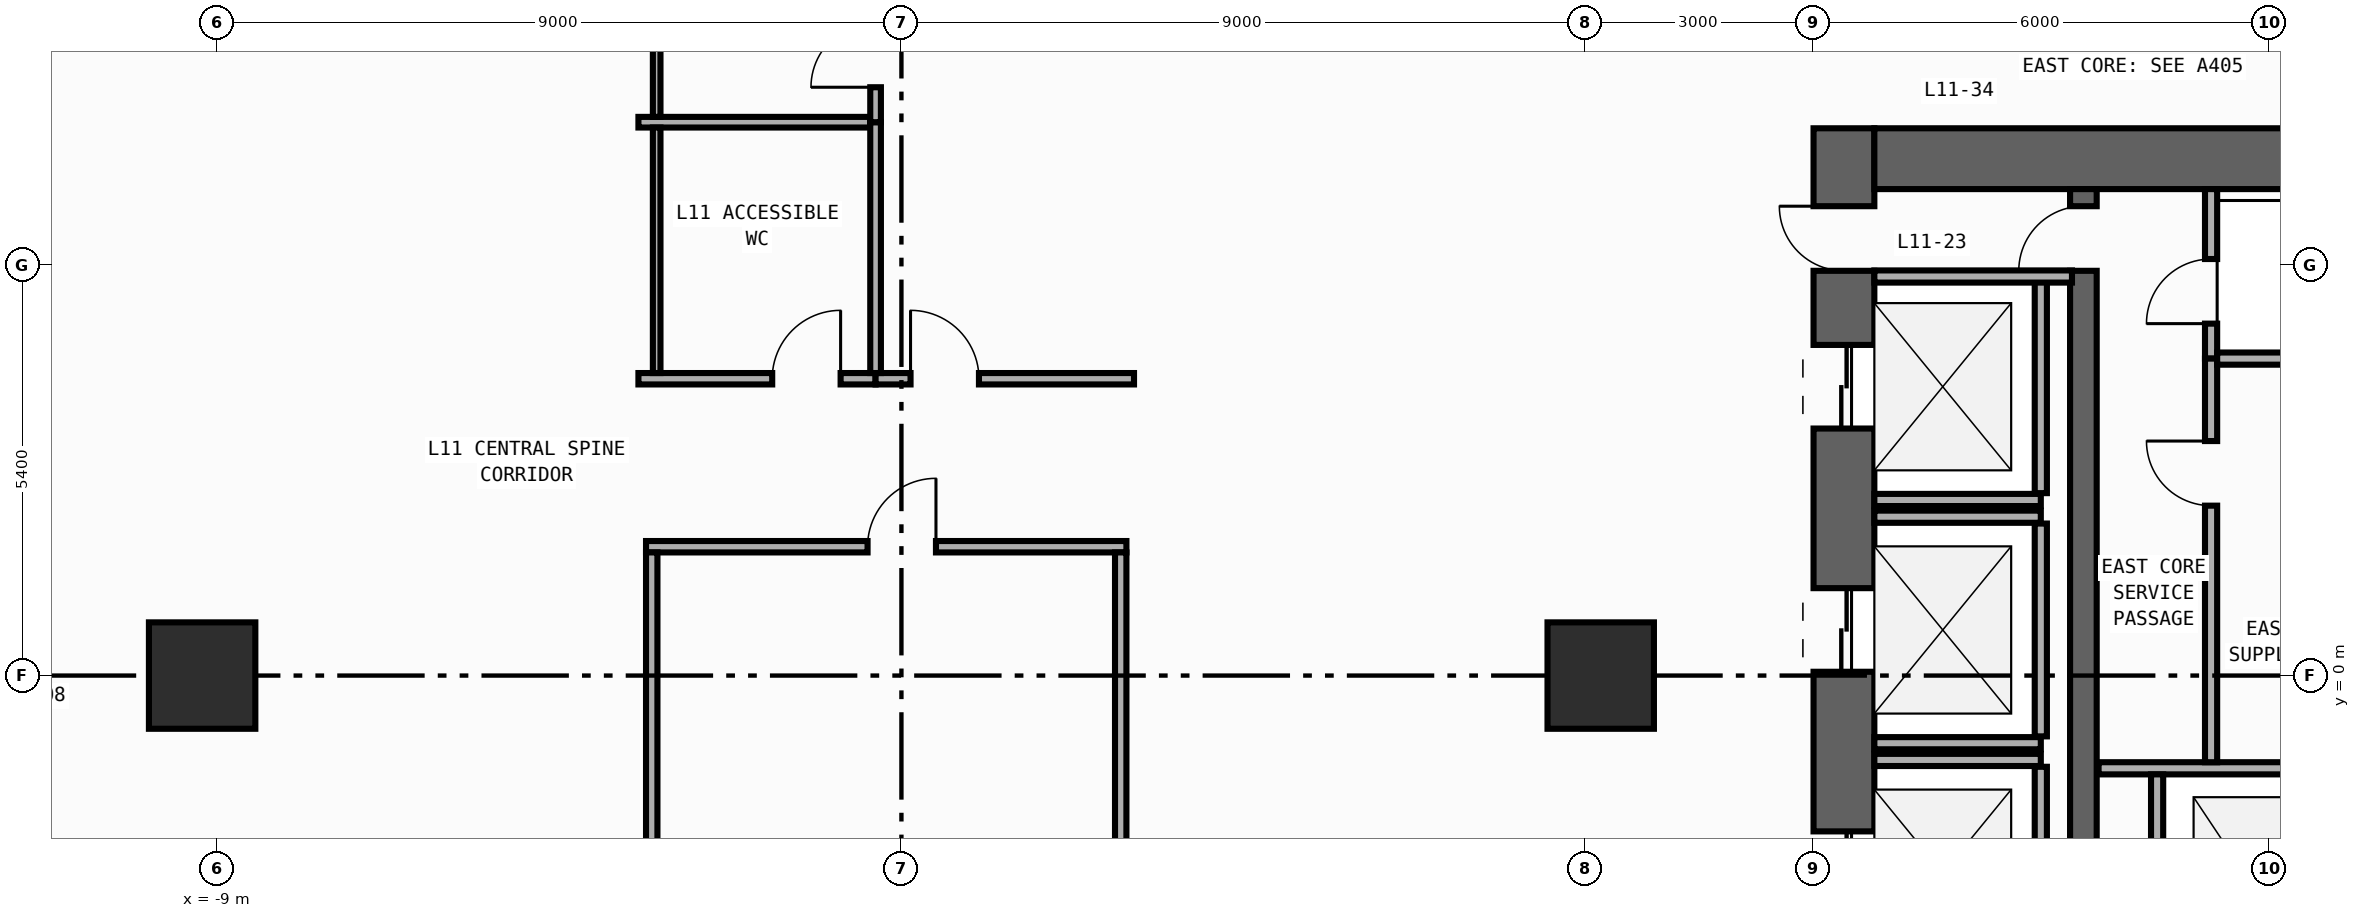
"""IFC4 building model, lengths in metres.
Left out: names, types, materials, properties, quantities, classifications, styles, units other than length and angle.
Written with IfcOpenShell. Run it as: python <this file> out.ifc"""

import sys

from ifc_helpers import new_model, si_unit, direction, frame, frame_2d, origin, origin_2d, place, context, subcontext, project, spatial, rectangle, extrude, element, fill, save


model = new_model("IFC4")
c1 = context("Model", 3, precision=1e-05, world=origin(), true_north=direction((0.0, 1.0)))
c2 = subcontext(c1, "Body", "Model", "MODEL_VIEW")
j1 = project(units=[si_unit("LENGTHUNIT", "METRE"), si_unit("PLANEANGLEUNIT", "RADIAN")], contexts=[c1])
p1 = place(None, origin())
s1 = spatial("IfcSite", under=j1, at=p1, CompositionType="ELEMENT")
p2 = place(p1, origin())
s2 = spatial("IfcBuilding", under=s1, at=p2, CompositionType="ELEMENT")
p3 = place(p2, frame((0.0, 0.0, 47.0)))
s3 = spatial("IfcBuildingStorey", under=s2, at=p3, CompositionType="ELEMENT", Elevation=47.0)
p4 = place(p3, frame((12.4, -19.8, 0.0), z_axis=(0.0, 0.0, 1.0), x_axis=(0.0, 1.0, 0.0)))
e1 = element("IfcWall", 1, at=p4, inside=s3, PredefinedType="SHEAR", context=c2, shape_type="SweptSolid", body=[
    extrude(rectangle(XDim=27.0, YDim=0.8, at=frame_2d((13.5, 0.0))), origin(), (0.0, 0.0, 1.0), 3.94),
])
p5 = place(p4, frame((23.05, 0.0, 0.0)))
e2 = element("IfcOpeningElement", 2, at=p5, cuts=e1, PredefinedType="OPENING", context=c2, shape_type="SweptSolid", body=[
    extrude(rectangle(XDim=1.1, YDim=2.2, at=frame_2d((0.55, 1.1))), frame((0.0, 0.41, 0.0), z_axis=(0.0, -1.0, 0.0), x_axis=(1.0, 0.0, 0.0)), (0.0, 0.0, 1.0), 0.82),
])
p6 = place(p4, frame((19.85, 0.0, 0.0)))
e3 = element("IfcOpeningElement", 3, at=p6, cuts=e1, PredefinedType="OPENING", context=c2, shape_type="SweptSolid", body=[
    extrude(rectangle(XDim=1.1, YDim=2.2, at=frame_2d((0.55, 1.1))), frame((0.0, 0.41, 0.0), z_axis=(0.0, -1.0, 0.0), x_axis=(1.0, 0.0, 0.0)), (0.0, 0.0, 1.0), 0.82),
])
p7 = place(p4, frame((16.65, 0.0, 0.0)))
e4 = element("IfcOpeningElement", 4, at=p7, cuts=e1, PredefinedType="OPENING", context=c2, shape_type="SweptSolid", body=[
    extrude(rectangle(XDim=1.1, YDim=2.2, at=frame_2d((0.55, 1.1))), frame((0.0, 0.41, 0.0), z_axis=(0.0, -1.0, 0.0), x_axis=(1.0, 0.0, 0.0)), (0.0, 0.0, 1.0), 0.82),
])
p8 = place(p4, frame((10.175, 0.0, 0.0)))
e5 = element("IfcOpeningElement", 5, at=p8, cuts=e1, PredefinedType="OPENING", context=c2, shape_type="SweptSolid", body=[
    extrude(rectangle(XDim=0.85, YDim=2.1, at=frame_2d((0.425, 1.05))), frame((0.0, 0.41, 0.0), z_axis=(0.0, -1.0, 0.0), x_axis=(1.0, 0.0, 0.0)), (0.0, 0.0, 1.0), 0.82),
])
p9 = place(p4, frame((12.725, 0.0, 0.0)))
e6 = element("IfcOpeningElement", 6, at=p9, cuts=e1, PredefinedType="OPENING", context=c2, shape_type="SweptSolid", body=[
    extrude(rectangle(XDim=1.15, YDim=2.2, at=frame_2d((0.575, 1.1))), frame((0.0, 0.41, 0.0), z_axis=(0.0, -1.0, 0.0), x_axis=(1.0, 0.0, 0.0)), (0.0, 0.0, 1.0), 0.82),
])
p10 = place(p4, frame((25.125, 0.0, 0.0)))
e7 = element("IfcOpeningElement", 7, at=p10, cuts=e1, PredefinedType="OPENING", context=c2, shape_type="SweptSolid", body=[
    extrude(rectangle(XDim=0.85, YDim=2.1, at=frame_2d((0.425, 1.05))), frame((0.0, 0.41, 0.0), z_axis=(0.0, -1.0, 0.0), x_axis=(1.0, 0.0, 0.0)), (0.0, 0.0, 1.0), 0.82),
])
p11 = place(p3, frame((12.8, 6.8, 0.0), z_axis=(0.0, 0.0, 1.0), x_axis=(1.0, 0.0, 0.0)))
e8 = element("IfcWall", 8, at=p11, inside=s3, PredefinedType="SHEAR", context=c2, shape_type="SweptSolid", body=[
    extrude(rectangle(XDim=6.8, YDim=0.8, at=frame_2d((3.4, 0.0))), origin(), (0.0, 0.0, 1.0), 3.94),
])
p12 = place(p3, frame((15.55, -19.0, 0.0), z_axis=(0.0, 0.0, 1.0), x_axis=(0.0, 1.0, 0.0)))
e9 = element("IfcWall", 9, at=p12, inside=s3, PredefinedType="SHEAR", context=c2, shape_type="SweptSolid", body=[
    extrude(rectangle(XDim=25.4, YDim=0.35, at=frame_2d((12.7, 0.0))), origin(), (0.0, 0.0, 1.0), 3.94),
])
p13 = place(p12, frame((11.925, 0.0, 0.0)))
e10 = element("IfcOpeningElement", 10, at=p13, cuts=e9, PredefinedType="OPENING", context=c2, shape_type="SweptSolid", body=[
    extrude(rectangle(XDim=1.15, YDim=2.2, at=frame_2d((0.575, 1.1))), frame((0.0, 0.185, 0.0), z_axis=(0.0, -1.0, 0.0), x_axis=(1.0, 0.0, 0.0)), (0.0, 0.0, 1.0), 0.37),
])
p14 = place(p12, frame((24.325, 0.0, 0.0)))
e11 = element("IfcOpeningElement", 11, at=p14, cuts=e9, PredefinedType="OPENING", context=c2, shape_type="SweptSolid", body=[
    extrude(rectangle(XDim=0.85, YDim=2.1, at=frame_2d((0.425, 1.05))), frame((0.0, 0.185, 0.0), z_axis=(0.0, -1.0, 0.0), x_axis=(1.0, 0.0, 0.0)), (0.0, 0.0, 1.0), 0.37),
])
for number, where, z_axis, x_axis in (
    (12, (-9.2, 0.0, 0.0), (0.0, 0.0, 1.0), (1.0, 0.0, 0.0)),
    (13, (9.2, 0.0, 0.0), (0.0, 0.0, 1.0), (1.0, 0.0, 0.0)),
):
    element("IfcColumn", number, at=place(p3, frame(where, z_axis=z_axis, x_axis=x_axis)), inside=s3, PredefinedType="COLUMN", context=c2, shape_type="SweptSolid", body=[
        extrude(rectangle(XDim=1.4, YDim=1.4, at=origin_2d()), origin(), (0.0, 0.0, 1.0), 4.2),
    ])
p15 = place(p3, frame((12.8, 2.31, 0.0), z_axis=(0.0, 0.0, 1.0), x_axis=(1.0, 0.0, 0.0)))
e14 = element("IfcWall", 14, at=p15, inside=s3, PredefinedType="STANDARD", context=c2, shape_type="SweptSolid", body=[
    extrude(rectangle(XDim=2.19, YDim=0.16, at=frame_2d((1.095, 0.0))), origin(), (0.0, 0.0, 1.0), 3.94),
])
p16 = place(p3, frame((14.99, 2.4, 0.0), z_axis=(0.0, 0.0, 1.0), x_axis=(0.0, 1.0, 0.0)))
e15 = element("IfcWall", 15, at=p16, inside=s3, PredefinedType="STANDARD", context=c2, shape_type="SweptSolid", body=[
    extrude(rectangle(XDim=2.8, YDim=0.16, at=frame_2d((1.4, 0.0))), origin(), (0.0, 0.0, 1.0), 3.94),
])
for number, where, z_axis, x_axis in (
    (16, (12.8, -0.89, 0.0), (0.0, 0.0, 1.0), (1.0, 0.0, 0.0)),
    (17, (12.8, 2.09, 0.0), (0.0, 0.0, 1.0), (1.0, 0.0, 0.0)),
):
    element("IfcWall", number, at=place(p3, frame(where, z_axis=z_axis, x_axis=x_axis)), inside=s3, PredefinedType="STANDARD", context=c2, shape_type="SweptSolid", body=[
        extrude(rectangle(XDim=2.19, YDim=0.16, at=frame_2d((1.095, 0.0))), origin(), (0.0, 0.0, 1.0), 3.94),
    ])
p17 = place(p3, frame((14.99, -0.8, 0.0), z_axis=(0.0, 0.0, 1.0), x_axis=(0.0, 1.0, 0.0)))
e18 = element("IfcWall", 18, at=p17, inside=s3, PredefinedType="STANDARD", context=c2, shape_type="SweptSolid", body=[
    extrude(rectangle(XDim=2.8, YDim=0.16, at=frame_2d((1.4, 0.0))), origin(), (0.0, 0.0, 1.0), 3.94),
])
p18 = place(p3, frame((12.8, -1.11, 0.0), z_axis=(0.0, 0.0, 1.0), x_axis=(1.0, 0.0, 0.0)))
e19 = element("IfcWall", 19, at=p18, inside=s3, PredefinedType="STANDARD", context=c2, shape_type="SweptSolid", body=[
    extrude(rectangle(XDim=2.19, YDim=0.16, at=frame_2d((1.095, 0.0))), origin(), (0.0, 0.0, 1.0), 3.94),
])
p19 = place(p3, frame((14.99, -4.0, 0.0), z_axis=(0.0, 0.0, 1.0), x_axis=(0.0, 1.0, 0.0)))
e20 = element("IfcWall", 20, at=p19, inside=s3, PredefinedType="STANDARD", context=c2, shape_type="SweptSolid", body=[
    extrude(rectangle(XDim=2.8, YDim=0.16, at=frame_2d((1.4, 0.0))), origin(), (0.0, 0.0, 1.0), 3.94),
])
p20 = place(p3, frame((15.75, -1.22, 0.0), z_axis=(0.0, 0.0, 1.0), x_axis=(1.0, 0.0, 0.0)))
e21 = element("IfcWall", 21, at=p20, inside=s3, PredefinedType="STANDARD", context=c2, shape_type="SweptSolid", body=[
    extrude(rectangle(XDim=3.8, YDim=0.16, at=frame_2d((1.9, 0.0))), origin(), (0.0, 0.0, 1.0), 3.94),
])
p21 = place(p3, frame((16.52, -4.28, 0.0), z_axis=(0.0, 0.0, 1.0), x_axis=(0.0, 1.0, 0.0)))
e22 = element("IfcWall", 22, at=p21, inside=s3, PredefinedType="STANDARD", context=c2, shape_type="SweptSolid", body=[
    extrude(rectangle(XDim=2.98, YDim=0.16, at=frame_2d((1.49, 0.0))), origin(), (0.0, 0.0, 1.0), 3.94),
])
p22 = place(p3, frame((12.8, 5.25, 0.0), z_axis=(0.0, 0.0, 1.0), x_axis=(1.0, 0.0, 0.0)))
e23 = element("IfcWall", 23, at=p22, inside=s3, PredefinedType="STANDARD", context=c2, shape_type="SweptSolid", body=[
    extrude(rectangle(XDim=2.6, YDim=0.16, at=frame_2d((1.3, 0.0))), origin(), (0.0, 0.0, 1.0), 3.94),
])
p23 = place(p3, frame((17.23, 4.17, 0.0), z_axis=(0.0, 0.0, 1.0), x_axis=(0.0, 1.0, 0.0)))
e24 = element("IfcWall", 24, at=p23, inside=s3, PredefinedType="PARTITIONING", context=c2, shape_type="SweptSolid", body=[
    extrude(rectangle(XDim=2.23, YDim=0.16, at=frame_2d((1.115, 0.0))), origin(), (0.0, 0.0, 1.0), 3.94),
])
p24 = place(p23, frame((0.46, 0.0, 0.0)))
e25 = element("IfcOpeningElement", 25, at=p24, cuts=e24, PredefinedType="OPENING", context=c2, shape_type="SweptSolid", body=[
    extrude(rectangle(XDim=0.85, YDim=2.1, at=frame_2d((0.425, 1.05))), frame((0.0, 0.09, 0.0), z_axis=(0.0, -1.0, 0.0), x_axis=(1.0, 0.0, 0.0)), (0.0, 0.0, 1.0), 0.18),
])
p25 = place(p3, frame((17.23, -1.14, 0.0), z_axis=(0.0, 0.0, 1.0), x_axis=(0.0, 1.0, 0.0)))
e26 = element("IfcWall", 26, at=p25, inside=s3, PredefinedType="PARTITIONING", context=c2, shape_type="SweptSolid", body=[
    extrude(rectangle(XDim=5.31, YDim=0.16, at=frame_2d((2.655, 0.0))), origin(), (0.0, 0.0, 1.0), 3.94),
])
p26 = place(p25, frame((3.375, 0.0, 0.0)))
e27 = element("IfcOpeningElement", 27, at=p26, cuts=e26, PredefinedType="OPENING", context=c2, shape_type="SweptSolid", body=[
    extrude(rectangle(XDim=0.85, YDim=2.1, at=frame_2d((0.425, 1.05))), frame((0.0, 0.09, 0.0), z_axis=(0.0, -1.0, 0.0), x_axis=(1.0, 0.0, 0.0)), (0.0, 0.0, 1.0), 0.18),
])
p27 = place(p3, frame((17.31, 4.17, 0.0), z_axis=(0.0, 0.0, 1.0), x_axis=(1.0, 0.0, 0.0)))
e28 = element("IfcWall", 28, at=p27, inside=s3, PredefinedType="PARTITIONING", context=c2, shape_type="SweptSolid", body=[
    extrude(rectangle(XDim=2.29, YDim=0.16, at=frame_2d((1.145, 0.0))), origin(), (0.0, 0.0, 1.0), 3.94),
])
p28 = place(p3, frame((-3.46, 3.905, 0.0), z_axis=(0.0, 0.0, 1.0), x_axis=(1.0, 0.0, 0.0)))
e29 = element("IfcWall", 29, at=p28, inside=s3, PredefinedType="PARTITIONING", context=c2, shape_type="SweptSolid", body=[
    extrude(rectangle(XDim=3.12, YDim=0.15, at=frame_2d((1.56, 0.0))), origin(), (0.0, 0.0, 1.0), 3.94),
])
p29 = place(p28, frame((1.76, 0.0, 0.0)))
e30 = element("IfcOpeningElement", 30, at=p29, cuts=e29, PredefinedType="OPENING", context=c2, shape_type="SweptSolid", body=[
    extrude(rectangle(XDim=0.9, YDim=2.15, at=frame_2d((0.45, 1.075))), frame((0.0, 0.085, 0.0), z_axis=(0.0, -1.0, 0.0), x_axis=(1.0, 0.0, 0.0)), (0.0, 0.0, 1.0), 0.17),
])
p30 = place(p3, frame((-0.34, 3.905, 0.0), z_axis=(0.0, 0.0, 1.0), x_axis=(1.0, 0.0, 0.0)))
e31 = element("IfcWall", 31, at=p30, inside=s3, PredefinedType="PARTITIONING", context=c2, shape_type="SweptSolid", body=[
    extrude(rectangle(XDim=3.4, YDim=0.15, at=frame_2d((1.7, 0.0))), origin(), (0.0, 0.0, 1.0), 3.94),
])
p31 = place(p30, frame((0.46, 0.0, 0.0)))
e32 = element("IfcOpeningElement", 32, at=p31, cuts=e31, PredefinedType="OPENING", context=c2, shape_type="SweptSolid", body=[
    extrude(rectangle(XDim=0.9, YDim=2.15, at=frame_2d((0.45, 1.075))), frame((0.0, 0.085, 0.0), z_axis=(0.0, -1.0, 0.0), x_axis=(1.0, 0.0, 0.0)), (0.0, 0.0, 1.0), 0.17),
])
p32 = place(p3, frame((-3.36, 1.695, 0.0), z_axis=(0.0, 0.0, 1.0), x_axis=(1.0, 0.0, 0.0)))
e33 = element("IfcWall", 33, at=p32, inside=s3, PredefinedType="PARTITIONING", context=c2, shape_type="SweptSolid", body=[
    extrude(rectangle(XDim=6.32, YDim=0.15, at=frame_2d((3.16, 0.0))), origin(), (0.0, 0.0, 1.0), 3.94),
])
p33 = place(p32, frame((2.915, 0.0, 0.0)))
e34 = element("IfcOpeningElement", 34, at=p33, cuts=e33, PredefinedType="OPENING", context=c2, shape_type="SweptSolid", body=[
    extrude(rectangle(XDim=0.9, YDim=2.15, at=frame_2d((0.45, 1.075))), frame((0.0, 0.085, 0.0), z_axis=(0.0, -1.0, 0.0), x_axis=(1.0, 0.0, 0.0)), (0.0, 0.0, 1.0), 0.17),
])
p34 = place(p3, frame((-3.285, -15.385, 0.0), z_axis=(0.0, 0.0, 1.0), x_axis=(0.0, 1.0, 0.0)))
e35 = element("IfcWall", 35, at=p34, inside=s3, PredefinedType="PARTITIONING", context=c2, shape_type="SweptSolid", body=[
    extrude(rectangle(XDim=17.005, YDim=0.15, at=frame_2d((8.502, 0.0))), origin(), (0.0, 0.0, 1.0), 3.94),
])
p35 = place(p34, frame((9.571, 0.0, 0.0)))
e36 = element("IfcOpeningElement", 36, at=p35, cuts=e35, PredefinedType="OPENING", context=c2, shape_type="SweptSolid", body=[
    extrude(rectangle(XDim=0.9, YDim=2.15, at=frame_2d((0.45, 1.075))), frame((0.0, 0.085, 0.0), z_axis=(0.0, -1.0, 0.0), x_axis=(1.0, 0.0, 0.0)), (0.0, 0.0, 1.0), 0.17),
])
p36 = place(p3, frame((2.885, -15.385, 0.0), z_axis=(0.0, 0.0, 1.0), x_axis=(0.0, 1.0, 0.0)))
e37 = element("IfcWall", 37, at=p36, inside=s3, PredefinedType="PARTITIONING", context=c2, shape_type="SweptSolid", body=[
    extrude(rectangle(XDim=17.005, YDim=0.15, at=frame_2d((8.502, 0.0))), origin(), (0.0, 0.0, 1.0), 3.94),
])
p37 = place(p36, frame((9.571, 0.0, 0.0)))
e38 = element("IfcOpeningElement", 38, at=p37, cuts=e37, PredefinedType="OPENING", context=c2, shape_type="SweptSolid", body=[
    extrude(rectangle(XDim=0.9, YDim=2.15, at=frame_2d((0.45, 1.075))), frame((0.0, 0.085, 0.0), z_axis=(0.0, -1.0, 0.0), x_axis=(1.0, 0.0, 0.0)), (0.0, 0.0, 1.0), 0.17),
])
p38 = place(p3, frame((-3.46, 7.28, 0.0), z_axis=(0.0, 0.0, 1.0), x_axis=(1.0, 0.0, 0.0)))
e39 = element("IfcWall", 39, at=p38, inside=s3, PredefinedType="PARTITIONING", context=c2, shape_type="SweptSolid", body=[
    extrude(rectangle(XDim=3.05, YDim=0.14, at=frame_2d((1.525, 0.0))), origin(), (0.0, 0.0, 1.0), 3.94),
])
p39 = place(p3, frame((-0.34, 3.98, 0.0), z_axis=(0.0, 0.0, 1.0), x_axis=(0.0, 1.0, 0.0)))
e40 = element("IfcWall", 40, at=p39, inside=s3, PredefinedType="PARTITIONING", context=c2, shape_type="SweptSolid", body=[
    extrude(rectangle(XDim=3.3, YDim=0.14, at=frame_2d((1.65, 0.0))), origin(), (0.0, 0.0, 1.0), 3.94),
])
p40 = place(p3, frame((-0.34, 7.28, 0.0), z_axis=(0.0, 0.0, 1.0), x_axis=(0.0, 1.0, 0.0)))
e41 = element("IfcWall", 41, at=p40, inside=s3, PredefinedType="PARTITIONING", context=c2, shape_type="SweptSolid", body=[
    extrude(rectangle(XDim=6.96, YDim=0.14, at=frame_2d((3.48, 0.0))), origin(), (0.0, 0.0, 1.0), 3.94),
])
p41 = place(p40, frame((0.46, 0.0, 0.0)))
e42 = element("IfcOpeningElement", 42, at=p41, cuts=e41, PredefinedType="OPENING", context=c2, shape_type="SweptSolid", body=[
    extrude(rectangle(XDim=0.85, YDim=2.1, at=frame_2d((0.425, 1.05))), frame((0.0, 0.08, 0.0), z_axis=(0.0, -1.0, 0.0), x_axis=(1.0, 0.0, 0.0)), (0.0, 0.0, 1.0), 0.16),
])
p42 = place(p3, frame((-3.22, 3.98, 0.0), z_axis=(0.0, 0.0, 1.0), x_axis=(0.0, 1.0, 0.0)))
e43 = element("IfcWall", 43, at=p42, inside=s3, PredefinedType="PARTITIONING", context=c2, shape_type="SweptSolid", body=[
    extrude(rectangle(XDim=3.23, YDim=0.1, at=frame_2d((1.615, 0.0))), origin(), (0.0, 0.0, 1.0), 3.94),
])
p43 = place(p3, frame((-3.22, 7.35, 0.0), z_axis=(0.0, 0.0, 1.0), x_axis=(0.0, 1.0, 0.0)))
e44 = element("IfcWall", 44, at=p43, inside=s3, PredefinedType="PARTITIONING", context=c2, shape_type="SweptSolid", body=[
    extrude(rectangle(XDim=6.6, YDim=0.1, at=frame_2d((3.3, 0.0))), origin(), (0.0, 0.0, 1.0), 3.94),
])
p44 = place(p5, origin())
e45 = element("IfcDoor", 45, at=p44, inside=s3, OperationType="DOUBLE_DOOR_SLIDING", PredefinedType="DOOR", context=c2, shape_type="SweptSolid", body=[
    extrude(rectangle(XDim=1.1, YDim=2.2, at=frame_2d((0.55, 1.1))), frame((0.0, 0.025, 0.0), z_axis=(0.0, -1.0, 0.0), x_axis=(1.0, 0.0, 0.0)), (0.0, 0.0, 1.0), 0.05),
])
fill(e2, e45)
p45 = place(p6, origin())
e46 = element("IfcDoor", 46, at=p45, inside=s3, OperationType="DOUBLE_DOOR_SLIDING", PredefinedType="DOOR", context=c2, shape_type="SweptSolid", body=[
    extrude(rectangle(XDim=1.1, YDim=2.2, at=frame_2d((0.55, 1.1))), frame((0.0, 0.025, 0.0), z_axis=(0.0, -1.0, 0.0), x_axis=(1.0, 0.0, 0.0)), (0.0, 0.0, 1.0), 0.05),
])
fill(e3, e46)
p46 = place(p7, origin())
e47 = element("IfcDoor", 47, at=p46, inside=s3, OperationType="DOUBLE_DOOR_SLIDING", PredefinedType="DOOR", context=c2, shape_type="SweptSolid", body=[
    extrude(rectangle(XDim=1.1, YDim=2.2, at=frame_2d((0.55, 1.1))), frame((0.0, 0.025, 0.0), z_axis=(0.0, -1.0, 0.0), x_axis=(1.0, 0.0, 0.0)), (0.0, 0.0, 1.0), 0.05),
])
fill(e4, e47)
p47 = place(p10, origin())
e48 = element("IfcDoor", 48, at=p47, inside=s3, OperationType="SINGLE_SWING_RIGHT", PredefinedType="DOOR", context=c2, shape_type="SweptSolid", body=[
    extrude(rectangle(XDim=0.85, YDim=2.1, at=frame_2d((0.425, 1.05))), frame((0.0, 0.025, 0.0), z_axis=(0.0, -1.0, 0.0), x_axis=(1.0, 0.0, 0.0)), (0.0, 0.0, 1.0), 0.05),
])
fill(e7, e48)
p48 = place(p14, origin())
e49 = element("IfcDoor", 49, at=p48, inside=s3, OperationType="SINGLE_SWING_LEFT", PredefinedType="DOOR", context=c2, shape_type="SweptSolid", body=[
    extrude(rectangle(XDim=0.85, YDim=2.1, at=frame_2d((0.425, 1.05))), frame((0.0, 0.025, 0.0), z_axis=(0.0, -1.0, 0.0), x_axis=(1.0, 0.0, 0.0)), (0.0, 0.0, 1.0), 0.05),
])
fill(e11, e49)
p49 = place(p24, origin())
e50 = element("IfcDoor", 50, at=p49, inside=s3, OperationType="SINGLE_SWING_LEFT", PredefinedType="DOOR", context=c2, shape_type="SweptSolid", body=[
    extrude(rectangle(XDim=0.85, YDim=2.1, at=frame_2d((0.425, 1.05))), frame((0.0, 0.025, 0.0), z_axis=(0.0, -1.0, 0.0), x_axis=(1.0, 0.0, 0.0)), (0.0, 0.0, 1.0), 0.05),
])
fill(e25, e50)
p50 = place(p26, origin())
e51 = element("IfcDoor", 51, at=p50, inside=s3, OperationType="SINGLE_SWING_RIGHT", PredefinedType="DOOR", context=c2, shape_type="SweptSolid", body=[
    extrude(rectangle(XDim=0.85, YDim=2.1, at=frame_2d((0.425, 1.05))), frame((0.0, 0.025, 0.0), z_axis=(0.0, -1.0, 0.0), x_axis=(1.0, 0.0, 0.0)), (0.0, 0.0, 1.0), 0.05),
])
fill(e27, e51)
p51 = place(p29, origin())
e52 = element("IfcDoor", 52, at=p51, inside=s3, OperationType="SINGLE_SWING_RIGHT", PredefinedType="DOOR", context=c2, shape_type="SweptSolid", body=[
    extrude(rectangle(XDim=0.9, YDim=2.15, at=frame_2d((0.45, 1.075))), frame((0.0, 0.025, 0.0), z_axis=(0.0, -1.0, 0.0), x_axis=(1.0, 0.0, 0.0)), (0.0, 0.0, 1.0), 0.05),
])
fill(e30, e52)
p52 = place(p31, origin())
e53 = element("IfcDoor", 53, at=p52, inside=s3, OperationType="SINGLE_SWING_LEFT", PredefinedType="DOOR", context=c2, shape_type="SweptSolid", body=[
    extrude(rectangle(XDim=0.9, YDim=2.15, at=frame_2d((0.45, 1.075))), frame((0.0, 0.025, 0.0), z_axis=(0.0, -1.0, 0.0), x_axis=(1.0, 0.0, 0.0)), (0.0, 0.0, 1.0), 0.05),
])
fill(e32, e53)
p53 = place(p33, origin())
e54 = element("IfcDoor", 54, at=p53, inside=s3, OperationType="SINGLE_SWING_RIGHT", PredefinedType="DOOR", context=c2, shape_type="SweptSolid", body=[
    extrude(rectangle(XDim=0.9, YDim=2.15, at=frame_2d((0.45, 1.075))), frame((0.0, 0.025, 0.0), z_axis=(0.0, -1.0, 0.0), x_axis=(1.0, 0.0, 0.0)), (0.0, 0.0, 1.0), 0.05),
])
fill(e34, e54)
p54 = place(p41, origin())
e55 = element("IfcDoor", 55, at=p54, inside=s3, OperationType="SINGLE_SWING_LEFT", PredefinedType="DOOR", context=c2, shape_type="SweptSolid", body=[
    extrude(rectangle(XDim=0.85, YDim=2.1, at=frame_2d((0.425, 1.05))), frame((0.0, 0.025, 0.0), z_axis=(0.0, -1.0, 0.0), x_axis=(1.0, 0.0, 0.0)), (0.0, 0.0, 1.0), 0.05),
])
fill(e42, e55)
save(model, sys.argv[1])
